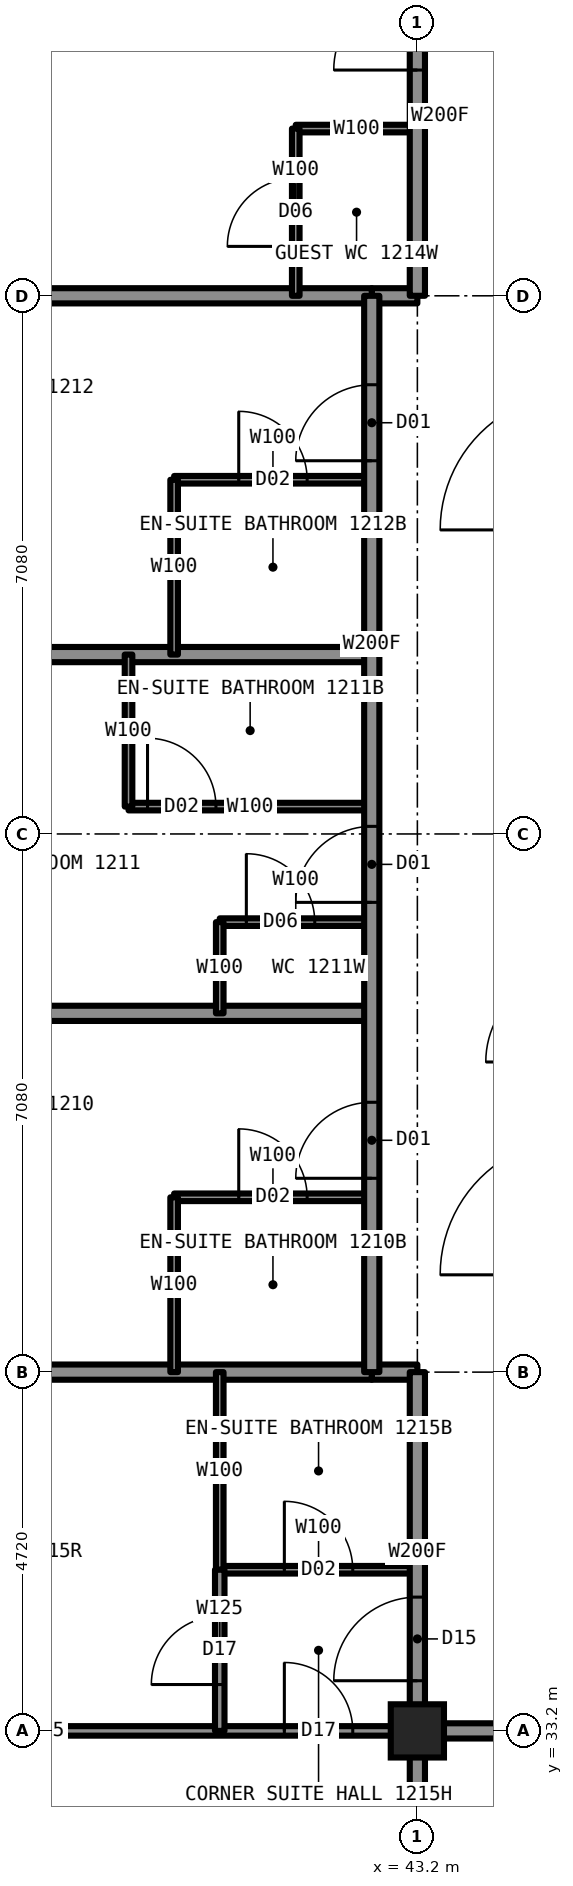
"""IFC4 building model, lengths in metres.
Left out: names, types, materials, properties, quantities, classifications, styles, units other than length and angle.
Written with IfcOpenShell. Run it as: python <this file> out.ifc"""

import sys

from ifc_helpers import new_model, si_unit, direction, frame, frame_2d, origin, origin_2d, place, context, subcontext, project, spatial, rectangle, hollow_rectangle, extrude, element, fill, save


model = new_model("IFC4")
c1 = context("Model", 3, precision=1e-05, world=origin(), true_north=direction((0.0, 1.0)))
c2 = subcontext(c1, "Body", "Model", "MODEL_VIEW")
j1 = project(units=[si_unit("LENGTHUNIT", "METRE"), si_unit("PLANEANGLEUNIT", "RADIAN")], contexts=[c1])
p1 = place(None, origin())
s1 = spatial("IfcSite", under=j1, at=p1, CompositionType="ELEMENT")
p2 = place(p1, origin())
s2 = spatial("IfcBuilding", under=s1, at=p2, CompositionType="ELEMENT")
p3 = place(p2, frame((0.0, 0.0, 49.5)))
s3 = spatial("IfcBuildingStorey", under=s2, at=p3, CompositionType="ELEMENT", Elevation=49.5)
p4 = place(p3, frame((43.2, 33.2, 0.0), z_axis=(0.0, 0.0, 1.0), x_axis=(1.0, 0.0, 0.0)))
e1 = element("IfcColumn", 1, at=p4, inside=s3, PredefinedType="COLUMN", context=c2, shape_type="SweptSolid", body=[
    extrude(hollow_rectangle(XDim=0.7, YDim=0.7, WallThickness=0.06, at=origin_2d()), origin(), (0.0, 0.0, 1.0), 3.5),
])
p5 = place(p3, frame((40.6, 43.84, 0.0), z_axis=(0.0, 0.0, 1.0), x_axis=(1.0, 0.0, 0.0)))
e2 = element("IfcWall", 2, at=p5, inside=s3, PredefinedType="PARTITIONING", context=c2, shape_type="SweptSolid", body=[
    extrude(rectangle(XDim=2.0, YDim=0.1, at=frame_2d((1.0, 0.0))), origin(), (0.0, 0.0, 1.0), 3.33),
])
p6 = place(p5, frame((0.35, 0.0, 0.0)))
e3 = element("IfcOpeningElement", 3, at=p6, cuts=e2, PredefinedType="OPENING", context=c2, shape_type="SweptSolid", body=[
    extrude(rectangle(XDim=0.9, YDim=2.1, at=frame_2d((0.45, 1.05))), frame((0.0, 0.06, 0.0), z_axis=(0.0, -1.0, 0.0), x_axis=(1.0, 0.0, 0.0)), (0.0, 0.0, 1.0), 0.12),
])
p7 = place(p3, frame((43.2, 33.2, 0.0), z_axis=(0.0, 0.0, 1.0), x_axis=(1.0, 0.0, 0.0)))
e4 = element("IfcWall", 4, at=p7, inside=s3, PredefinedType="PARTITIONING", context=c2, shape_type="SweptSolid", body=[
    extrude(rectangle(XDim=23.6, YDim=0.2, at=frame_2d((11.8, 0.0))), origin(), (0.0, 0.0, 1.0), 3.33),
])
p8 = place(p7, frame((3.0, 0.0, 0.0)))
e5 = element("IfcOpeningElement", 5, at=p8, cuts=e4, PredefinedType="OPENING", context=c2, shape_type="SweptSolid", body=[
    extrude(rectangle(XDim=1.0, YDim=2.2, at=frame_2d((0.5, 1.1))), frame((0.0, 0.11, 0.0), z_axis=(0.0, -1.0, 0.0), x_axis=(1.0, 0.0, 0.0)), (0.0, 0.0, 1.0), 0.22),
])
p9 = place(p7, frame((12.44, 0.0, 0.0)))
e6 = element("IfcOpeningElement", 6, at=p9, cuts=e4, PredefinedType="OPENING", context=c2, shape_type="SweptSolid", body=[
    extrude(rectangle(XDim=1.0, YDim=2.2, at=frame_2d((0.5, 1.1))), frame((0.0, 0.11, 0.0), z_axis=(0.0, -1.0, 0.0), x_axis=(1.0, 0.0, 0.0)), (0.0, 0.0, 1.0), 0.22),
])
p10 = place(p7, frame((19.28, 0.0, 0.0)))
e7 = element("IfcOpeningElement", 7, at=p10, cuts=e4, PredefinedType="OPENING", context=c2, shape_type="SweptSolid", body=[
    extrude(rectangle(XDim=1.0, YDim=2.2, at=frame_2d((0.5, 1.1))), frame((0.0, 0.11, 0.0), z_axis=(0.0, -1.0, 0.0), x_axis=(1.0, 0.0, 0.0)), (0.0, 0.0, 1.0), 0.22),
])
p11 = place(p3, frame((33.3, 33.2, 0.0), z_axis=(0.0, 0.0, 1.0), x_axis=(1.0, 0.0, 0.0)))
e8 = element("IfcWall", 8, at=p11, inside=s3, PredefinedType="PARTITIONING", context=c2, shape_type="SweptSolid", body=[
    extrude(rectangle(XDim=9.9, YDim=0.125, at=frame_2d((4.95, 0.0))), origin(), (0.0, 0.0, 1.0), 2.573),
])
p12 = place(p11, frame((8.15, 0.0, 0.0)))
e9 = element("IfcOpeningElement", 9, at=p12, cuts=e8, PredefinedType="OPENING", context=c2, shape_type="SweptSolid", body=[
    extrude(rectangle(XDim=0.9, YDim=2.2, at=frame_2d((0.45, 1.1))), frame((0.0, 0.073, 0.0), z_axis=(0.0, -1.0, 0.0), x_axis=(1.0, 0.0, 0.0)), (0.0, 0.0, 1.0), 0.145),
])
p13 = place(p3, frame((33.3, 42.64, 0.0), z_axis=(0.0, 0.0, 1.0), x_axis=(1.0, 0.0, 0.0)))
e10 = element("IfcWall", 10, at=p13, inside=s3, PredefinedType="PARTITIONING", context=c2, shape_type="SweptSolid", body=[
    extrude(rectangle(XDim=9.3, YDim=0.2, at=frame_2d((4.65, 0.0))), origin(), (0.0, 0.0, 1.0), 2.723),
])
p14 = place(p3, frame((40.0, 40.22, 0.0), z_axis=(0.0, 0.0, 1.0), x_axis=(1.0, 0.0, 0.0)))
e11 = element("IfcWall", 11, at=p14, inside=s3, PredefinedType="PARTITIONING", context=c2, shape_type="SweptSolid", body=[
    extrude(rectangle(XDim=2.6, YDim=0.1, at=frame_2d((1.3, 0.0))), origin(), (0.0, 0.0, 1.0), 2.723),
])
p15 = place(p14, frame((0.85, 0.0, 0.0)))
e12 = element("IfcOpeningElement", 12, at=p15, cuts=e11, PredefinedType="OPENING", context=c2, shape_type="SweptSolid", body=[
    extrude(rectangle(XDim=0.9, YDim=2.1, at=frame_2d((0.45, 1.05))), frame((0.0, 0.06, 0.0), z_axis=(0.0, -1.0, 0.0), x_axis=(1.0, 0.0, 0.0)), (0.0, 0.0, 1.0), 0.12),
])
p16 = place(p3, frame((42.6, 37.92, 0.0), z_axis=(0.0, 0.0, 1.0), x_axis=(1.0, 0.0, 0.0)))
e13 = element("IfcWall", 13, at=p16, inside=s3, PredefinedType="PARTITIONING", context=c2, shape_type="SweptSolid", body=[
    extrude(rectangle(XDim=0.6, YDim=0.2, at=frame_2d((0.3, 0.0))), origin(), (0.0, 0.0, 1.0), 2.573),
])
p17 = place(p3, frame((33.3, 37.92, 0.0), z_axis=(0.0, 0.0, 1.0), x_axis=(1.0, 0.0, 0.0)))
e14 = element("IfcWall", 14, at=p17, inside=s3, PredefinedType="PARTITIONING", context=c2, shape_type="SweptSolid", body=[
    extrude(rectangle(XDim=9.3, YDim=0.2, at=frame_2d((4.65, 0.0))), origin(), (0.0, 0.0, 1.0), 2.573),
])
p18 = place(p3, frame((40.6, 35.32, 0.0), z_axis=(0.0, 0.0, 1.0), x_axis=(1.0, 0.0, 0.0)))
e15 = element("IfcWall", 15, at=p18, inside=s3, PredefinedType="PARTITIONING", context=c2, shape_type="SweptSolid", body=[
    extrude(rectangle(XDim=2.6, YDim=0.1, at=frame_2d((1.3, 0.0))), origin(), (0.0, 0.0, 1.0), 3.33),
])
p19 = place(p18, frame((0.85, 0.0, 0.0)))
e16 = element("IfcOpeningElement", 16, at=p19, cuts=e15, PredefinedType="OPENING", context=c2, shape_type="SweptSolid", body=[
    extrude(rectangle(XDim=0.9, YDim=2.1, at=frame_2d((0.45, 1.05))), frame((0.0, 0.06, 0.0), z_axis=(0.0, -1.0, 0.0), x_axis=(1.0, 0.0, 0.0)), (0.0, 0.0, 1.0), 0.12),
])
p20 = place(p3, frame((39.4, 45.36, 0.0), z_axis=(0.0, 0.0, 1.0), x_axis=(1.0, 0.0, 0.0)))
e17 = element("IfcWall", 17, at=p20, inside=s3, PredefinedType="PARTITIONING", context=c2, shape_type="SweptSolid", body=[
    extrude(rectangle(XDim=3.2, YDim=0.1, at=frame_2d((1.6, 0.0))), origin(), (0.0, 0.0, 1.0), 3.33),
])
p21 = place(p20, frame((0.25, 0.0, 0.0)))
e18 = element("IfcOpeningElement", 18, at=p21, cuts=e17, PredefinedType="OPENING", context=c2, shape_type="SweptSolid", body=[
    extrude(rectangle(XDim=0.9, YDim=2.1, at=frame_2d((0.45, 1.05))), frame((0.0, 0.06, 0.0), z_axis=(0.0, -1.0, 0.0), x_axis=(1.0, 0.0, 0.0)), (0.0, 0.0, 1.0), 0.12),
])
p22 = place(p3, frame((33.3, 47.36, 0.0), z_axis=(0.0, 0.0, 1.0), x_axis=(1.0, 0.0, 0.0)))
e19 = element("IfcWall", 19, at=p22, inside=s3, PredefinedType="PARTITIONING", context=c2, shape_type="SweptSolid", body=[
    extrude(rectangle(XDim=9.3, YDim=0.2, at=frame_2d((4.65, 0.0))), origin(), (0.0, 0.0, 1.0), 2.723),
])
p23 = place(p3, frame((40.0, 49.66, 0.0), z_axis=(0.0, 0.0, 1.0), x_axis=(1.0, 0.0, 0.0)))
e20 = element("IfcWall", 20, at=p23, inside=s3, PredefinedType="PARTITIONING", context=c2, shape_type="SweptSolid", body=[
    extrude(rectangle(XDim=2.6, YDim=0.1, at=frame_2d((1.3, 0.0))), origin(), (0.0, 0.0, 1.0), 2.723),
])
p24 = place(p23, frame((0.85, 0.0, 0.0)))
e21 = element("IfcOpeningElement", 21, at=p24, cuts=e20, PredefinedType="OPENING", context=c2, shape_type="SweptSolid", body=[
    extrude(rectangle(XDim=0.9, YDim=2.1, at=frame_2d((0.45, 1.05))), frame((0.0, 0.06, 0.0), z_axis=(0.0, -1.0, 0.0), x_axis=(1.0, 0.0, 0.0)), (0.0, 0.0, 1.0), 0.12),
])
p25 = place(p3, frame((42.6, 52.08, 0.0), z_axis=(0.0, 0.0, 1.0), x_axis=(1.0, 0.0, 0.0)))
e22 = element("IfcWall", 22, at=p25, inside=s3, PredefinedType="PARTITIONING", context=c2, shape_type="SweptSolid", body=[
    extrude(rectangle(XDim=0.6, YDim=0.2, at=frame_2d((0.3, 0.0))), origin(), (0.0, 0.0, 1.0), 2.573),
])
p26 = place(p3, frame((33.3, 52.08, 0.0), z_axis=(0.0, 0.0, 1.0), x_axis=(1.0, 0.0, 0.0)))
e23 = element("IfcWall", 23, at=p26, inside=s3, PredefinedType="PARTITIONING", context=c2, shape_type="SweptSolid", body=[
    extrude(rectangle(XDim=9.3, YDim=0.2, at=frame_2d((4.65, 0.0))), origin(), (0.0, 0.0, 1.0), 2.573),
])
p27 = place(p3, frame((41.6, 54.28, 0.0), z_axis=(0.0, 0.0, 1.0), x_axis=(1.0, 0.0, 0.0)))
e24 = element("IfcWall", 24, at=p27, inside=s3, PredefinedType="PARTITIONING", context=c2, shape_type="SweptSolid", body=[
    extrude(rectangle(XDim=1.6, YDim=0.1, at=frame_2d((0.8, 0.0))), origin(), (0.0, 0.0, 1.0), 2.723),
])
p28 = place(p3, frame((43.2, 33.2, 0.0), z_axis=(0.0, 0.0, 1.0), x_axis=(0.0, 1.0, 0.0)))
e25 = element("IfcWall", 25, at=p28, inside=s3, PredefinedType="PARTITIONING", context=c2, shape_type="SweptSolid", body=[
    extrude(rectangle(XDim=4.72, YDim=0.2, at=frame_2d((2.36, 0.0))), origin(), (0.0, 0.0, 1.0), 3.33),
])
p29 = place(p28, frame((0.66, 0.0, 0.0)))
e26 = element("IfcOpeningElement", 26, at=p29, cuts=e25, PredefinedType="OPENING", context=c2, shape_type="SweptSolid", body=[
    extrude(rectangle(XDim=1.1, YDim=2.2, at=frame_2d((0.55, 1.1))), frame((0.0, 0.11, 0.0), z_axis=(0.0, -1.0, 0.0), x_axis=(1.0, 0.0, 0.0)), (0.0, 0.0, 1.0), 0.22),
])
p30 = place(p3, frame((43.2, 52.08, 0.0), z_axis=(0.0, 0.0, 1.0), x_axis=(0.0, 1.0, 0.0)))
e27 = element("IfcWall", 27, at=p30, inside=s3, PredefinedType="PARTITIONING", context=c2, shape_type="SweptSolid", body=[
    extrude(rectangle(XDim=4.72, YDim=0.2, at=frame_2d((2.36, 0.0))), origin(), (0.0, 0.0, 1.0), 3.33),
])
p31 = place(p30, frame((2.97, 0.0, 0.0)))
e28 = element("IfcOpeningElement", 28, at=p31, cuts=e27, PredefinedType="OPENING", context=c2, shape_type="SweptSolid", body=[
    extrude(rectangle(XDim=1.1, YDim=2.2, at=frame_2d((0.55, 1.1))), frame((0.0, 0.11, 0.0), z_axis=(0.0, -1.0, 0.0), x_axis=(1.0, 0.0, 0.0)), (0.0, 0.0, 1.0), 0.22),
])
p32 = place(p3, frame((43.2, 23.3, 0.0), z_axis=(0.0, 0.0, 1.0), x_axis=(0.0, 1.0, 0.0)))
e29 = element("IfcWall", 29, at=p32, inside=s3, PredefinedType="PARTITIONING", context=c2, shape_type="SweptSolid", body=[
    extrude(rectangle(XDim=9.9, YDim=0.2, at=frame_2d((4.95, 0.0))), origin(), (0.0, 0.0, 1.0), 2.573),
])
p33 = place(p3, frame((42.6, 37.92, 0.0), z_axis=(0.0, 0.0, 1.0), x_axis=(0.0, 1.0, 0.0)))
e30 = element("IfcWall", 30, at=p33, inside=s3, PredefinedType="PARTITIONING", context=c2, shape_type="SweptSolid", body=[
    extrude(rectangle(XDim=14.16, YDim=0.2, at=frame_2d((7.08, 0.0))), origin(), (0.0, 0.0, 1.0), 3.33),
])
p34 = place(p33, frame((2.55, 0.0, 0.0)))
e31 = element("IfcOpeningElement", 31, at=p34, cuts=e30, PredefinedType="OPENING", context=c2, shape_type="SweptSolid", body=[
    extrude(rectangle(XDim=1.0, YDim=2.2, at=frame_2d((0.5, 1.1))), frame((0.0, 0.11, 0.0), z_axis=(0.0, -1.0, 0.0), x_axis=(1.0, 0.0, 0.0)), (0.0, 0.0, 1.0), 0.22),
])
p35 = place(p33, frame((6.18, 0.0, 0.0)))
e32 = element("IfcOpeningElement", 32, at=p35, cuts=e30, PredefinedType="OPENING", context=c2, shape_type="SweptSolid", body=[
    extrude(rectangle(XDim=1.0, YDim=2.2, at=frame_2d((0.5, 1.1))), frame((0.0, 0.11, 0.0), z_axis=(0.0, -1.0, 0.0), x_axis=(1.0, 0.0, 0.0)), (0.0, 0.0, 1.0), 0.22),
])
p36 = place(p33, frame((11.99, 0.0, 0.0)))
e33 = element("IfcOpeningElement", 33, at=p36, cuts=e30, PredefinedType="OPENING", context=c2, shape_type="SweptSolid", body=[
    extrude(rectangle(XDim=1.0, YDim=2.2, at=frame_2d((0.5, 1.1))), frame((0.0, 0.11, 0.0), z_axis=(0.0, -1.0, 0.0), x_axis=(1.0, 0.0, 0.0)), (0.0, 0.0, 1.0), 0.22),
])
p37 = place(p3, frame((41.6, 52.08, 0.0), z_axis=(0.0, 0.0, 1.0), x_axis=(0.0, 1.0, 0.0)))
e34 = element("IfcWall", 34, at=p37, inside=s3, PredefinedType="PARTITIONING", context=c2, shape_type="SweptSolid", body=[
    extrude(rectangle(XDim=2.2, YDim=0.1, at=frame_2d((1.1, 0.0))), origin(), (0.0, 0.0, 1.0), 3.33),
])
p38 = place(p37, frame((0.65, 0.0, 0.0)))
e35 = element("IfcOpeningElement", 35, at=p38, cuts=e34, PredefinedType="OPENING", context=c2, shape_type="SweptSolid", body=[
    extrude(rectangle(XDim=0.9, YDim=2.1, at=frame_2d((0.45, 1.05))), frame((0.0, 0.06, 0.0), z_axis=(0.0, -1.0, 0.0), x_axis=(1.0, 0.0, 0.0)), (0.0, 0.0, 1.0), 0.12),
])
p39 = place(p3, frame((40.6, 35.32, 0.0), z_axis=(0.0, 0.0, 1.0), x_axis=(0.0, 1.0, 0.0)))
e36 = element("IfcWall", 36, at=p39, inside=s3, PredefinedType="PARTITIONING", context=c2, shape_type="SweptSolid", body=[
    extrude(rectangle(XDim=2.6, YDim=0.1, at=frame_2d((1.3, 0.0))), origin(), (0.0, 0.0, 1.0), 3.33),
])
p40 = place(p3, frame((40.6, 42.64, 0.0), z_axis=(0.0, 0.0, 1.0), x_axis=(0.0, 1.0, 0.0)))
e37 = element("IfcWall", 37, at=p40, inside=s3, PredefinedType="PARTITIONING", context=c2, shape_type="SweptSolid", body=[
    extrude(rectangle(XDim=1.2, YDim=0.1, at=frame_2d((0.6, 0.0))), origin(), (0.0, 0.0, 1.0), 3.33),
])
p41 = place(p3, frame((40.6, 33.2, 0.0), z_axis=(0.0, 0.0, 1.0), x_axis=(0.0, 1.0, 0.0)))
e38 = element("IfcWall", 38, at=p41, inside=s3, PredefinedType="PARTITIONING", context=c2, shape_type="SweptSolid", body=[
    extrude(rectangle(XDim=2.12, YDim=0.125, at=frame_2d((1.06, 0.0))), origin(), (0.0, 0.0, 1.0), 3.33),
])
p42 = place(p41, frame((0.61, 0.0, 0.0)))
e39 = element("IfcOpeningElement", 39, at=p42, cuts=e38, PredefinedType="OPENING", context=c2, shape_type="SweptSolid", body=[
    extrude(rectangle(XDim=0.9, YDim=2.2, at=frame_2d((0.45, 1.1))), frame((0.0, 0.073, 0.0), z_axis=(0.0, -1.0, 0.0), x_axis=(1.0, 0.0, 0.0)), (0.0, 0.0, 1.0), 0.145),
])
p43 = place(p3, frame((40.0, 37.92, 0.0), z_axis=(0.0, 0.0, 1.0), x_axis=(0.0, 1.0, 0.0)))
e40 = element("IfcWall", 40, at=p43, inside=s3, PredefinedType="PARTITIONING", context=c2, shape_type="SweptSolid", body=[
    extrude(rectangle(XDim=2.3, YDim=0.1, at=frame_2d((1.15, 0.0))), origin(), (0.0, 0.0, 1.0), 3.33),
])
p44 = place(p3, frame((40.0, 47.36, 0.0), z_axis=(0.0, 0.0, 1.0), x_axis=(0.0, 1.0, 0.0)))
e41 = element("IfcWall", 41, at=p44, inside=s3, PredefinedType="PARTITIONING", context=c2, shape_type="SweptSolid", body=[
    extrude(rectangle(XDim=2.3, YDim=0.1, at=frame_2d((1.15, 0.0))), origin(), (0.0, 0.0, 1.0), 3.33),
])
p45 = place(p3, frame((39.4, 45.36, 0.0), z_axis=(0.0, 0.0, 1.0), x_axis=(0.0, 1.0, 0.0)))
e42 = element("IfcWall", 42, at=p45, inside=s3, PredefinedType="PARTITIONING", context=c2, shape_type="SweptSolid", body=[
    extrude(rectangle(XDim=2.0, YDim=0.1, at=frame_2d((1.0, 0.0))), origin(), (0.0, 0.0, 1.0), 3.33),
])
p46 = place(p34, origin())
e43 = element("IfcDoor", 43, at=p46, inside=s3, OperationType="SINGLE_SWING_LEFT", PredefinedType="DOOR", context=c2, shape_type="SweptSolid", body=[
    extrude(rectangle(XDim=1.0, YDim=2.2, at=frame_2d((0.5, 1.1))), frame((0.0, 0.025, 0.0), z_axis=(0.0, -1.0, 0.0), x_axis=(1.0, 0.0, 0.0)), (0.0, 0.0, 1.0), 0.05),
])
fill(e31, e43)
p47 = place(p15, origin())
e44 = element("IfcDoor", 44, at=p47, inside=s3, OperationType="SINGLE_SWING_RIGHT", PredefinedType="DOOR", context=c2, shape_type="SweptSolid", body=[
    extrude(rectangle(XDim=0.9, YDim=2.1, at=frame_2d((0.45, 1.05))), frame((0.0, 0.025, 0.0), z_axis=(0.0, -1.0, 0.0), x_axis=(1.0, 0.0, 0.0)), (0.0, 0.0, 1.0), 0.05),
])
fill(e12, e44)
p48 = place(p35, origin())
e45 = element("IfcDoor", 45, at=p48, inside=s3, OperationType="SINGLE_SWING_LEFT", PredefinedType="DOOR", context=c2, shape_type="SweptSolid", body=[
    extrude(rectangle(XDim=1.0, YDim=2.2, at=frame_2d((0.5, 1.1))), frame((0.0, 0.025, 0.0), z_axis=(0.0, -1.0, 0.0), x_axis=(1.0, 0.0, 0.0)), (0.0, 0.0, 1.0), 0.05),
])
fill(e32, e45)
p49 = place(p21, origin())
e46 = element("IfcDoor", 46, at=p49, inside=s3, OperationType="SINGLE_SWING_RIGHT", PredefinedType="DOOR", context=c2, shape_type="SweptSolid", body=[
    extrude(rectangle(XDim=0.9, YDim=2.1, at=frame_2d((0.45, 1.05))), frame((0.0, 0.025, 0.0), z_axis=(0.0, -1.0, 0.0), x_axis=(1.0, 0.0, 0.0)), (0.0, 0.0, 1.0), 0.05),
])
fill(e18, e46)
p50 = place(p6, origin())
e47 = element("IfcDoor", 47, at=p50, inside=s3, OperationType="SINGLE_SWING_LEFT", PredefinedType="DOOR", context=c2, shape_type="SweptSolid", body=[
    extrude(rectangle(XDim=0.9, YDim=2.1, at=frame_2d((0.45, 1.05))), frame((0.0, 0.025, 0.0), z_axis=(0.0, -1.0, 0.0), x_axis=(1.0, 0.0, 0.0)), (0.0, 0.0, 1.0), 0.05),
])
fill(e3, e47)
p51 = place(p36, origin())
e48 = element("IfcDoor", 48, at=p51, inside=s3, OperationType="SINGLE_SWING_LEFT", PredefinedType="DOOR", context=c2, shape_type="SweptSolid", body=[
    extrude(rectangle(XDim=1.0, YDim=2.2, at=frame_2d((0.5, 1.1))), frame((0.0, 0.025, 0.0), z_axis=(0.0, -1.0, 0.0), x_axis=(1.0, 0.0, 0.0)), (0.0, 0.0, 1.0), 0.05),
])
fill(e33, e48)
p52 = place(p24, origin())
e49 = element("IfcDoor", 49, at=p52, inside=s3, OperationType="SINGLE_SWING_RIGHT", PredefinedType="DOOR", context=c2, shape_type="SweptSolid", body=[
    extrude(rectangle(XDim=0.9, YDim=2.1, at=frame_2d((0.45, 1.05))), frame((0.0, 0.025, 0.0), z_axis=(0.0, -1.0, 0.0), x_axis=(1.0, 0.0, 0.0)), (0.0, 0.0, 1.0), 0.05),
])
fill(e21, e49)
p53 = place(p31, origin())
e50 = element("IfcDoor", 50, at=p53, inside=s3, OperationType="SINGLE_SWING_LEFT", PredefinedType="DOOR", context=c2, shape_type="SweptSolid", body=[
    extrude(rectangle(XDim=1.1, YDim=2.2, at=frame_2d((0.55, 1.1))), frame((0.0, 0.025, 0.0), z_axis=(0.0, -1.0, 0.0), x_axis=(1.0, 0.0, 0.0)), (0.0, 0.0, 1.0), 0.05),
])
fill(e28, e50)
p54 = place(p38, origin())
e51 = element("IfcDoor", 51, at=p54, inside=s3, OperationType="SINGLE_SWING_LEFT", PredefinedType="DOOR", context=c2, shape_type="SweptSolid", body=[
    extrude(rectangle(XDim=0.9, YDim=2.1, at=frame_2d((0.45, 1.05))), frame((0.0, 0.025, 0.0), z_axis=(0.0, -1.0, 0.0), x_axis=(1.0, 0.0, 0.0)), (0.0, 0.0, 1.0), 0.05),
])
fill(e35, e51)
p55 = place(p12, origin())
e52 = element("IfcDoor", 52, at=p55, inside=s3, OperationType="SINGLE_SWING_LEFT", PredefinedType="DOOR", context=c2, shape_type="SweptSolid", body=[
    extrude(rectangle(XDim=0.9, YDim=2.2, at=frame_2d((0.45, 1.1))), frame((0.0, 0.025, 0.0), z_axis=(0.0, -1.0, 0.0), x_axis=(1.0, 0.0, 0.0)), (0.0, 0.0, 1.0), 0.05),
])
fill(e9, e52)
p56 = place(p19, origin())
e53 = element("IfcDoor", 53, at=p56, inside=s3, OperationType="SINGLE_SWING_RIGHT", PredefinedType="DOOR", context=c2, shape_type="SweptSolid", body=[
    extrude(rectangle(XDim=0.9, YDim=2.1, at=frame_2d((0.45, 1.05))), frame((0.0, 0.025, 0.0), z_axis=(0.0, -1.0, 0.0), x_axis=(1.0, 0.0, 0.0)), (0.0, 0.0, 1.0), 0.05),
])
fill(e16, e53)
p57 = place(p29, origin())
e54 = element("IfcDoor", 54, at=p57, inside=s3, OperationType="SINGLE_SWING_LEFT", PredefinedType="DOOR", context=c2, shape_type="SweptSolid", body=[
    extrude(rectangle(XDim=1.1, YDim=2.2, at=frame_2d((0.55, 1.1))), frame((0.0, 0.025, 0.0), z_axis=(0.0, -1.0, 0.0), x_axis=(1.0, 0.0, 0.0)), (0.0, 0.0, 1.0), 0.05),
])
fill(e26, e54)
p58 = place(p42, origin())
e55 = element("IfcDoor", 55, at=p58, inside=s3, OperationType="SINGLE_SWING_LEFT", PredefinedType="DOOR", context=c2, shape_type="SweptSolid", body=[
    extrude(rectangle(XDim=0.9, YDim=2.2, at=frame_2d((0.45, 1.1))), frame((0.0, 0.025, 0.0), z_axis=(0.0, -1.0, 0.0), x_axis=(1.0, 0.0, 0.0)), (0.0, 0.0, 1.0), 0.05),
])
fill(e39, e55)
save(model, sys.argv[1])
